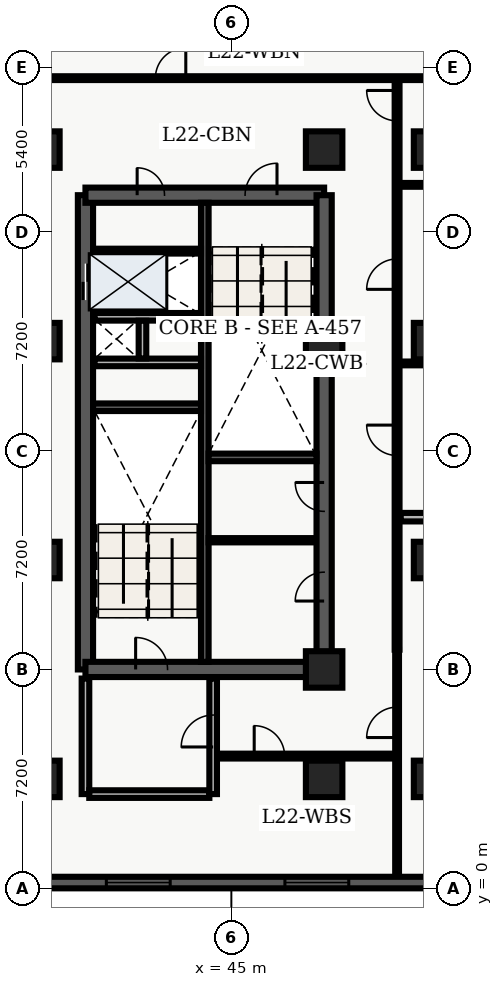
"""IFC4 building model, lengths in metres.
Left out: names, types, materials, properties, quantities, classifications, styles, units other than length and angle.
Written with IfcOpenShell. Run it as: python <this file> out.ifc"""

import sys

from ifc_helpers import new_model, entity, si_unit, converted_unit, direction, frame, origin_with_axes, origin_2d_with_axis, place, context, subcontext, project, spatial, polyline, rectangle, outline, extrude, element, fill, save


model = new_model("IFC4")
c1 = context("Model", 3, precision=1e-05, world=origin_with_axes(), true_north=direction((0.0, 1.0)))
c2 = subcontext(c1, "Body", "Model", "MODEL_VIEW")
j1 = project(units=[si_unit("LENGTHUNIT", "METRE"), converted_unit("PLANEANGLEUNIT", "DEGREE", entity("IfcPlaneAngleMeasure", 0.017), si_unit("PLANEANGLEUNIT", "RADIAN"), dimensions=[0, 0, 0, 0, 0, 0, 0])], contexts=[c1])
p1 = place(None, origin_with_axes())
s1 = spatial("IfcSite", under=j1, at=p1, CompositionType="ELEMENT")
p2 = place(p1, origin_with_axes())
s2 = spatial("IfcBuilding", under=s1, at=p2, CompositionType="ELEMENT")
p3 = place(p2, frame((0.0, 0.0, 93.0), z_axis=(0.0, 0.0, 1.0), x_axis=(1.0, 0.0, 0.0)))
s3 = spatial("IfcBuildingStorey", under=s2, at=p3, CompositionType="ELEMENT", Elevation=93.0)
p4 = place(p3, frame((40.2, 7.2, 0.0), z_axis=(0.0, 0.0, 1.0), x_axis=(0.0, 1.0, 0.0)))
e1 = element("IfcWall", 1, at=p4, inside=s3, PredefinedType="SHEAR", context=c2, shape_type="SweptSolid", body=[
    extrude(outline(polyline([(0.0, -0.25), (15.6, -0.25), (15.6, 0.25), (0.0, 0.25), (0.0, -0.25)])), origin_with_axes(), (0.0, 0.0, 1.0), 3.66),
])
p5 = place(p4, frame((12.75, 0.0, 0.0), z_axis=(0.0, 0.0, 1.0), x_axis=(1.0, 0.0, 0.0)))
e2 = element("IfcOpeningElement", 2, at=p5, cuts=e1, PredefinedType="OPENING", context=c2, shape_type="SweptSolid", body=[
    extrude(rectangle(XDim=1.2, YDim=0.52, at=origin_2d_with_axis()), origin_with_axes(), (0.0, 0.0, 1.0), 2.15),
])
p6 = place(p3, frame((40.2, 7.2, 0.0), z_axis=(0.0, 0.0, 1.0), x_axis=(1.0, 0.0, 0.0)))
e3 = element("IfcWall", 3, at=p6, inside=s3, PredefinedType="SHEAR", context=c2, shape_type="SweptSolid", body=[
    extrude(outline(polyline([(0.0, -0.25), (7.85, -0.25), (7.85, 0.25), (0.0, 0.25), (0.0, -0.25)])), origin_with_axes(), (0.0, 0.0, 1.0), 3.66),
])
p7 = place(p6, frame((2.175, 0.0, 0.0), z_axis=(0.0, 0.0, 1.0), x_axis=(1.0, 0.0, 0.0)))
e4 = element("IfcOpeningElement", 4, at=p7, cuts=e3, PredefinedType="OPENING", context=c2, shape_type="SweptSolid", body=[
    extrude(rectangle(XDim=1.05, YDim=0.52, at=origin_2d_with_axis()), origin_with_axes(), (0.0, 0.0, 1.0), 2.15),
])
p8 = place(p3, frame((40.2, 22.8, 0.0), z_axis=(0.0, 0.0, 1.0), x_axis=(1.0, 0.0, 0.0)))
e5 = element("IfcWall", 5, at=p8, inside=s3, PredefinedType="SHEAR", context=c2, shape_type="SweptSolid", body=[
    extrude(outline(polyline([(0.0, -0.25), (7.85, -0.25), (7.85, 0.25), (0.0, 0.25), (0.0, -0.25)])), origin_with_axes(), (0.0, 0.0, 1.0), 3.66),
])
p9 = place(p8, frame((5.775, 0.0, 0.0), z_axis=(0.0, 0.0, 1.0), x_axis=(1.0, 0.0, 0.0)))
e6 = element("IfcOpeningElement", 6, at=p9, cuts=e5, PredefinedType="OPENING", context=c2, shape_type="SweptSolid", body=[
    extrude(rectangle(XDim=1.05, YDim=0.52, at=origin_2d_with_axis()), origin_with_axes(), (0.0, 0.0, 1.0), 2.15),
])
p10 = place(p8, frame((2.15, 0.0, 0.0), z_axis=(0.0, 0.0, 1.0), x_axis=(1.0, 0.0, 0.0)))
e7 = element("IfcOpeningElement", 7, at=p10, cuts=e5, PredefinedType="OPENING", context=c2, shape_type="SweptSolid", body=[
    extrude(rectangle(XDim=0.9, YDim=0.52, at=origin_2d_with_axis()), origin_with_axes(), (0.0, 0.0, 1.0), 2.15),
])
p11 = place(p3, frame((48.05, 7.2, 0.0), z_axis=(0.0, 0.0, 1.0), x_axis=(0.0, 1.0, 0.0)))
e8 = element("IfcWall", 8, at=p11, inside=s3, PredefinedType="SHEAR", context=c2, shape_type="SweptSolid", body=[
    extrude(outline(polyline([(0.0, -0.25), (15.6, -0.25), (15.6, 0.25), (0.0, 0.25), (0.0, -0.25)])), origin_with_axes(), (0.0, 0.0, 1.0), 3.66),
])
p12 = place(p11, frame((2.725, 0.0, 0.0), z_axis=(0.0, 0.0, 1.0), x_axis=(1.0, 0.0, 0.0)))
e9 = element("IfcOpeningElement", 9, at=p12, cuts=e8, PredefinedType="OPENING", context=c2, shape_type="SweptSolid", body=[
    extrude(rectangle(XDim=0.95, YDim=0.52, at=origin_2d_with_axis()), origin_with_axes(), (0.0, 0.0, 1.0), 2.15),
])
p13 = place(p11, frame((5.675, 0.0, 0.0), z_axis=(0.0, 0.0, 1.0), x_axis=(1.0, 0.0, 0.0)))
e10 = element("IfcOpeningElement", 10, at=p13, cuts=e8, PredefinedType="OPENING", context=c2, shape_type="SweptSolid", body=[
    extrude(rectangle(XDim=0.95, YDim=0.52, at=origin_2d_with_axis()), origin_with_axes(), (0.0, 0.0, 1.0), 2.15),
])
p14 = place(p3, frame((44.125, 7.45, 0.0), z_axis=(0.0, 0.0, 1.0), x_axis=(0.0, 1.0, 0.0)))
e11 = element("IfcWall", 11, at=p14, inside=s3, PredefinedType="SHEAR", context=c2, shape_type="SweptSolid", body=[
    extrude(outline(polyline([(0.0, -0.125), (15.1, -0.125), (15.1, 0.125), (0.0, 0.125), (0.0, -0.125)])), origin_with_axes(), (0.0, 0.0, 1.0), 3.66),
])
for number, where, z_axis, x_axis in (
    (12, (40.45, 15.825, 0.0), (0.0, 0.0, 1.0), (1.0, 0.0, 0.0)),
    (13, (44.25, 14.175, 0.0), (0.0, 0.0, 1.0), (1.0, 0.0, 0.0)),
):
    element("IfcWall", number, at=place(p3, frame(where, z_axis=z_axis, x_axis=x_axis)), inside=s3, PredefinedType="SHEAR", context=c2, shape_type="SweptSolid", body=[
        extrude(outline(polyline([(0.0, -0.125), (3.55, -0.125), (3.55, 0.125), (0.0, 0.125), (0.0, -0.125)])), origin_with_axes(), (0.0, 0.0, 1.0), 3.66),
    ])
for number, where, z_axis, x_axis in (
    (14, (40.5, 17.3, 0.0), (0.0, 0.0, 1.0), (1.0, 0.0, 0.0)),
    (15, (40.5, 18.8, 0.0), (0.0, 0.0, 1.0), (1.0, 0.0, 0.0)),
):
    element("IfcWall", number, at=place(p3, frame(where, z_axis=z_axis, x_axis=x_axis)), inside=s3, PredefinedType="SOLIDWALL", context=c2, shape_type="SweptSolid", body=[
        extrude(outline(polyline([(0.0, -0.125), (3.5, -0.125), (3.5, 0.125), (0.0, 0.125), (0.0, -0.125)])), origin_with_axes(), (0.0, 0.0, 1.0), 2.7),
    ])
p15 = place(p3, frame((42.075, 17.43, 0.0), z_axis=(0.0, 0.0, 1.0), x_axis=(0.0, 1.0, 0.0)))
e16 = element("IfcWall", 16, at=p15, inside=s3, PredefinedType="SOLIDWALL", context=c2, shape_type="SweptSolid", body=[
    extrude(outline(polyline([(0.0, -0.125), (1.24, -0.125), (1.24, 0.125), (0.0, 0.125), (0.0, -0.125)])), origin_with_axes(), (0.0, 0.0, 1.0), 2.7),
])
p16 = place(p3, frame((40.2, 3.1, 0.0), z_axis=(0.0, 0.0, 1.0), x_axis=(0.0, 1.0, 0.0)))
e17 = element("IfcWall", 17, at=p16, inside=s3, PredefinedType="SOLIDWALL", context=c2, shape_type="SweptSolid", body=[
    extrude(outline(polyline([(0.0, -0.125), (3.8, -0.125), (3.8, 0.125), (0.0, 0.125), (0.0, -0.125)])), origin_with_axes(), (0.0, 0.0, 1.0), 2.7),
])
p17 = place(p3, frame((40.325, 3.1, 0.0), z_axis=(0.0, 0.0, 1.0), x_axis=(1.0, 0.0, 0.0)))
e18 = element("IfcWall", 18, at=p17, inside=s3, PredefinedType="SOLIDWALL", context=c2, shape_type="SweptSolid", body=[
    extrude(outline(polyline([(0.0, -0.125), (3.95, -0.125), (3.95, 0.125), (0.0, 0.125), (0.0, -0.125)])), origin_with_axes(), (0.0, 0.0, 1.0), 2.7),
])
p18 = place(p3, frame((44.4, 3.1, 0.0), z_axis=(0.0, 0.0, 1.0), x_axis=(0.0, 1.0, 0.0)))
e19 = element("IfcWall", 19, at=p18, inside=s3, PredefinedType="SOLIDWALL", context=c2, shape_type="SweptSolid", body=[
    extrude(outline(polyline([(0.0, -0.125), (3.8, -0.125), (3.8, 0.125), (0.0, 0.125), (0.0, -0.125)])), origin_with_axes(), (0.0, 0.0, 1.0), 2.7),
])
p19 = place(p18, frame((2.075, 0.0, 0.0), z_axis=(0.0, 0.0, 1.0), x_axis=(1.0, 0.0, 0.0)))
e20 = element("IfcOpeningElement", 20, at=p19, cuts=e19, PredefinedType="OPENING", context=c2, shape_type="SweptSolid", body=[
    extrude(rectangle(XDim=1.05, YDim=0.27, at=origin_2d_with_axis()), origin_with_axes(), (0.0, 0.0, 1.0), 2.15),
])
for number, where, z_axis, x_axis in (
    (21, (38.75, 3.6, 0.0), (0.0, 0.0, 1.0), (1.0, 0.0, 0.0)),
    (22, (38.75, 10.8, 0.0), (0.0, 0.0, 1.0), (1.0, 0.0, 0.0)),
    (23, (38.75, 18.0, 0.0), (0.0, 0.0, 1.0), (1.0, 0.0, 0.0)),
    (24, (38.75, 24.3, 0.0), (0.0, 0.0, 1.0), (1.0, 0.0, 0.0)),
    (25, (48.05, 3.6, 0.0), (0.0, 0.0, 1.0), (1.0, 0.0, 0.0)),
    (26, (48.05, 7.2, 0.0), (0.0, 0.0, 1.0), (1.0, 0.0, 0.0)),
    (27, (48.05, 18.0, 0.0), (0.0, 0.0, 1.0), (1.0, 0.0, 0.0)),
    (28, (48.05, 24.3, 0.0), (0.0, 0.0, 1.0), (1.0, 0.0, 0.0)),
    (29, (51.6, 3.6, 0.0), (0.0, 0.0, 1.0), (1.0, 0.0, 0.0)),
    (30, (51.6, 10.8, 0.0), (0.0, 0.0, 1.0), (1.0, 0.0, 0.0)),
    (31, (51.6, 18.0, 0.0), (0.0, 0.0, 1.0), (1.0, 0.0, 0.0)),
    (32, (51.6, 24.3, 0.0), (0.0, 0.0, 1.0), (1.0, 0.0, 0.0)),
):
    element("IfcColumn", number, at=place(p3, frame(where, z_axis=z_axis, x_axis=x_axis)), inside=s3, PredefinedType="COLUMN", context=c2, shape_type="SweptSolid", body=[
        extrude(rectangle(XDim=1.2, YDim=1.2, at=origin_2d_with_axis()), origin_with_axes(), (0.0, 0.0, 1.0), 3.9),
    ])
p20 = place(p3, frame((40.5, 20.96, 0.0), z_axis=(0.0, 0.0, 1.0), x_axis=(1.0, 0.0, 0.0)))
e33 = element("IfcWall", 33, at=p20, inside=s3, PredefinedType="PARTITIONING", context=c2, shape_type="SweptSolid", body=[
    extrude(outline(polyline([(0.0, -0.08), (3.5, -0.08), (3.5, 0.08), (0.0, 0.08), (0.0, -0.08)])), origin_with_axes(), (0.0, 0.0, 1.0), 2.7),
])
p21 = place(p3, frame((44.25, 11.45, 0.0), z_axis=(0.0, 0.0, 1.0), x_axis=(1.0, 0.0, 0.0)))
e34 = element("IfcWall", 34, at=p21, inside=s3, PredefinedType="PARTITIONING", context=c2, shape_type="SweptSolid", body=[
    extrude(outline(polyline([(0.0, -0.07), (3.5, -0.07), (3.5, 0.07), (0.0, 0.07), (0.0, -0.07)])), origin_with_axes(), (0.0, 0.0, 1.0), 2.7),
])
p22 = place(p3, frame((50.45, 7.85, 0.0), z_axis=(0.0, 0.0, 1.0), x_axis=(0.0, 1.0, 0.0)))
e35 = element("IfcWall", 35, at=p22, inside=s3, PredefinedType="PARTITIONING", context=c2, shape_type="SweptSolid", body=[
    extrude(outline(polyline([(0.0, -0.08), (18.8, -0.08), (18.8, 0.08), (0.0, 0.08), (0.0, -0.08)])), origin_with_axes(), (0.0, 0.0, 1.0), 2.7),
])
p23 = place(p22, frame((6.888, 0.0, 0.0), z_axis=(0.0, 0.0, 1.0), x_axis=(1.0, 0.0, 0.0)))
e36 = element("IfcOpeningElement", 36, at=p23, cuts=e35, PredefinedType="OPENING", context=c2, shape_type="SweptSolid", body=[
    extrude(rectangle(XDim=1.0, YDim=0.18, at=origin_2d_with_axis()), origin_with_axes(), (0.0, 0.0, 1.0), 2.15),
])
p24 = place(p22, frame((12.353, 0.0, 0.0), z_axis=(0.0, 0.0, 1.0), x_axis=(1.0, 0.0, 0.0)))
e37 = element("IfcOpeningElement", 37, at=p24, cuts=e35, PredefinedType="OPENING", context=c2, shape_type="SweptSolid", body=[
    extrude(rectangle(XDim=1.0, YDim=0.18, at=origin_2d_with_axis()), origin_with_axes(), (0.0, 0.0, 1.0), 2.15),
])
p25 = place(p22, frame((17.895, 0.0, 0.0), z_axis=(0.0, 0.0, 1.0), x_axis=(1.0, 0.0, 0.0)))
e38 = element("IfcOpeningElement", 38, at=p25, cuts=e35, PredefinedType="OPENING", context=c2, shape_type="SweptSolid", body=[
    extrude(rectangle(XDim=1.0, YDim=0.18, at=origin_2d_with_axis()), origin_with_axes(), (0.0, 0.0, 1.0), 2.15),
])
p26 = place(p3, frame((38.76, 26.65, 0.0), z_axis=(0.0, 0.0, 1.0), x_axis=(1.0, 0.0, 0.0)))
e39 = element("IfcWall", 39, at=p26, inside=s3, PredefinedType="PARTITIONING", context=c2, shape_type="SweptSolid", body=[
    extrude(outline(polyline([(0.0, -0.062), (20.88, -0.062), (20.88, 0.062), (0.0, 0.062), (0.0, -0.062)])), origin_with_axes(), (0.0, 0.0, 1.0), 2.7),
])
p27 = place(p26, frame((4.24, 0.0, 0.0), z_axis=(0.0, 0.0, 1.0), x_axis=(1.0, 0.0, 0.0)))
e40 = element("IfcOpeningElement", 40, at=p27, cuts=e39, PredefinedType="OPENING", context=c2, shape_type="SweptSolid", body=[
    extrude(rectangle(XDim=1.0, YDim=0.145, at=origin_2d_with_axis()), origin_with_axes(), (0.0, 0.0, 1.0), 2.15),
])
p28 = place(p3, frame((44.55, 4.35, 0.0), z_axis=(0.0, 0.0, 1.0), x_axis=(1.0, 0.0, 0.0)))
e41 = element("IfcWall", 41, at=p28, inside=s3, PredefinedType="PARTITIONING", context=c2, shape_type="SweptSolid", body=[
    extrude(outline(polyline([(0.0, -0.08), (5.9, -0.08), (5.9, 0.08), (0.0, 0.08), (0.0, -0.08)])), origin_with_axes(), (0.0, 0.0, 1.0), 2.7),
])
p29 = place(p28, frame((1.7, 0.0, 0.0), z_axis=(0.0, 0.0, 1.0), x_axis=(1.0, 0.0, 0.0)))
e42 = element("IfcOpeningElement", 42, at=p29, cuts=e41, PredefinedType="OPENING", context=c2, shape_type="SweptSolid", body=[
    extrude(rectangle(XDim=1.0, YDim=0.18, at=origin_2d_with_axis()), origin_with_axes(), (0.0, 0.0, 1.0), 2.15),
])
p30 = place(p3, frame((50.45, 0.36, 0.0), z_axis=(0.0, 0.0, 1.0), x_axis=(0.0, 1.0, 0.0)))
e43 = element("IfcWall", 43, at=p30, inside=s3, PredefinedType="PARTITIONING", context=c2, shape_type="SweptSolid", body=[
    extrude(outline(polyline([(0.0, -0.062), (7.49, -0.062), (7.49, 0.062), (0.0, 0.062), (0.0, -0.062)])), origin_with_axes(), (0.0, 0.0, 1.0), 2.7),
])
p31 = place(p30, frame((5.1, 0.0, 0.0), z_axis=(0.0, 0.0, 1.0), x_axis=(1.0, 0.0, 0.0)))
e44 = element("IfcOpeningElement", 44, at=p31, cuts=e43, PredefinedType="OPENING", context=c2, shape_type="SweptSolid", body=[
    extrude(rectangle(XDim=1.0, YDim=0.145, at=origin_2d_with_axis()), origin_with_axes(), (0.0, 0.0, 1.0), 2.15),
])
p32 = place(p3, frame((50.57, 12.209, 0.0), z_axis=(0.0, 0.0, 1.0), x_axis=(1.0, 0.0, 0.0)))
e45 = element("IfcWall", 45, at=p32, inside=s3, PredefinedType="PARTITIONING", context=c2, shape_type="SweptSolid", body=[
    extrude(outline(polyline([(0.0, -0.14), (9.055, -0.14), (9.055, 0.14), (0.0, 0.14), (0.0, -0.14)])), origin_with_axes(), (0.0, 0.0, 1.0), 2.7),
])
p33 = place(p32, frame((4.525, 0.0, 0.0), z_axis=(0.0, 0.0, 1.0), x_axis=(1.0, 0.0, 0.0)))
e46 = element("IfcOpeningElement", 46, at=p33, cuts=e45, PredefinedType="OPENING", context=c2, shape_type="SweptSolid", body=[
    extrude(rectangle(XDim=0.95, YDim=0.3, at=origin_2d_with_axis()), origin_with_axes(), (0.0, 0.0, 1.0), 2.15),
])
for number, where, z_axis, x_axis in (
    (47, (50.57, 17.266, 0.0), (0.0, 0.0, 1.0), (1.0, 0.0, 0.0)),
    (48, (50.57, 23.14, 0.0), (0.0, 0.0, 1.0), (1.0, 0.0, 0.0)),
):
    element("IfcWall", number, at=place(p3, frame(where, z_axis=z_axis, x_axis=x_axis)), inside=s3, PredefinedType="PARTITIONING", context=c2, shape_type="SweptSolid", body=[
        extrude(outline(polyline([(0.0, -0.062), (9.055, -0.062), (9.055, 0.062), (0.0, 0.062), (0.0, -0.062)])), origin_with_axes(), (0.0, 0.0, 1.0), 2.7),
    ])
p34 = place(p3, frame((57.22, 0.19, 0.0), z_axis=(0.0, 0.0, 1.0), x_axis=(-1.0, 0.0, 0.0)))
e49 = element("IfcWall", 49, at=p34, inside=s3, PredefinedType="SOLIDWALL", context=c2, shape_type="SweptSolid", body=[
    extrude(outline(polyline([(0.0, -0.19), (18.82, -0.19), (18.82, 0.19), (0.0, 0.19), (0.0, -0.19)])), origin_with_axes(), (0.0, 0.0, 1.0), 3.66),
])
p35 = place(p34, frame((3.537, 0.0, 0.45), z_axis=(0.0, 0.0, 1.0), x_axis=(1.0, 0.0, 0.0)))
e50 = element("IfcOpeningElement", 50, at=p35, cuts=e49, PredefinedType="OPENING", context=c2, shape_type="SweptSolid", body=[
    extrude(rectangle(XDim=2.1, YDim=0.4, at=origin_2d_with_axis()), origin_with_axes(), (0.0, 0.0, 1.0), 2.2),
])
p36 = place(p34, frame((9.41, 0.0, 0.45), z_axis=(0.0, 0.0, 1.0), x_axis=(1.0, 0.0, 0.0)))
e51 = element("IfcOpeningElement", 51, at=p36, cuts=e49, PredefinedType="OPENING", context=c2, shape_type="SweptSolid", body=[
    extrude(rectangle(XDim=2.1, YDim=0.4, at=origin_2d_with_axis()), origin_with_axes(), (0.0, 0.0, 1.0), 2.2),
])
p37 = place(p34, frame((15.283, 0.0, 0.45), z_axis=(0.0, 0.0, 1.0), x_axis=(1.0, 0.0, 0.0)))
e52 = element("IfcOpeningElement", 52, at=p37, cuts=e49, PredefinedType="OPENING", context=c2, shape_type="SweptSolid", body=[
    extrude(rectangle(XDim=2.1, YDim=0.4, at=origin_2d_with_axis()), origin_with_axes(), (0.0, 0.0, 1.0), 2.2),
])
p38 = place(p4, frame((12.75, 0.0, 0.0), z_axis=(0.0, 0.0, 1.0), x_axis=(1.0, 0.0, 0.0)))
e53 = element("IfcDoor", 53, at=p38, inside=s3, OperationType="DOUBLE_DOOR_SLIDING", PredefinedType="DOOR", context=c2, shape_type="SweptSolid", body=[
    extrude(rectangle(XDim=1.2, YDim=0.09, at=origin_2d_with_axis()), origin_with_axes(), (0.0, 0.0, 1.0), 2.15),
])
fill(e2, e53)
p39 = place(p6, frame((2.175, 0.0, 0.0), z_axis=(0.0, 0.0, 1.0), x_axis=(1.0, 0.0, 0.0)))
e54 = element("IfcDoor", 54, at=p39, inside=s3, OperationType="SINGLE_SWING_LEFT", PredefinedType="DOOR", context=c2, shape_type="SweptSolid", body=[
    extrude(rectangle(XDim=1.05, YDim=0.09, at=origin_2d_with_axis()), origin_with_axes(), (0.0, 0.0, 1.0), 2.15),
])
fill(e4, e54)
p40 = place(p8, frame((5.775, 0.0, 0.0), z_axis=(0.0, 0.0, 1.0), x_axis=(1.0, 0.0, 0.0)))
e55 = element("IfcDoor", 55, at=p40, inside=s3, OperationType="SINGLE_SWING_RIGHT", PredefinedType="DOOR", context=c2, shape_type="SweptSolid", body=[
    extrude(rectangle(XDim=1.05, YDim=0.09, at=origin_2d_with_axis()), origin_with_axes(), (0.0, 0.0, 1.0), 2.15),
])
fill(e6, e55)
p41 = place(p18, frame((2.075, 0.0, 0.0), z_axis=(0.0, 0.0, 1.0), x_axis=(1.0, 0.0, 0.0)))
e56 = element("IfcDoor", 56, at=p41, inside=s3, OperationType="SINGLE_SWING_LEFT", PredefinedType="DOOR", context=c2, shape_type="SweptSolid", body=[
    extrude(rectangle(XDim=1.05, YDim=0.09, at=origin_2d_with_axis()), origin_with_axes(), (0.0, 0.0, 1.0), 2.15),
])
fill(e20, e56)
p42 = place(p8, frame((2.15, 0.0, 0.0), z_axis=(0.0, 0.0, 1.0), x_axis=(1.0, 0.0, 0.0)))
e57 = element("IfcDoor", 57, at=p42, inside=s3, OperationType="SINGLE_SWING_LEFT", PredefinedType="DOOR", context=c2, shape_type="SweptSolid", body=[
    extrude(rectangle(XDim=0.9, YDim=0.09, at=origin_2d_with_axis()), origin_with_axes(), (0.0, 0.0, 1.0), 2.15),
])
fill(e7, e57)
p43 = place(p11, frame((2.725, 0.0, 0.0), z_axis=(0.0, 0.0, 1.0), x_axis=(1.0, 0.0, 0.0)))
e58 = element("IfcDoor", 58, at=p43, inside=s3, OperationType="SINGLE_SWING_LEFT", PredefinedType="DOOR", context=c2, shape_type="SweptSolid", body=[
    extrude(rectangle(XDim=0.95, YDim=0.09, at=origin_2d_with_axis()), origin_with_axes(), (0.0, 0.0, 1.0), 2.15),
])
fill(e9, e58)
p44 = place(p11, frame((5.675, 0.0, 0.0), z_axis=(0.0, 0.0, 1.0), x_axis=(1.0, 0.0, 0.0)))
e59 = element("IfcDoor", 59, at=p44, inside=s3, OperationType="SINGLE_SWING_RIGHT", PredefinedType="DOOR", context=c2, shape_type="SweptSolid", body=[
    extrude(rectangle(XDim=0.95, YDim=0.09, at=origin_2d_with_axis()), origin_with_axes(), (0.0, 0.0, 1.0), 2.15),
])
fill(e10, e59)
p45 = place(p28, frame((1.7, 0.0, 0.0), z_axis=(0.0, 0.0, 1.0), x_axis=(1.0, 0.0, 0.0)))
e60 = element("IfcDoor", 60, at=p45, inside=s3, OperationType="SINGLE_SWING_LEFT", PredefinedType="DOOR", context=c2, shape_type="SweptSolid", body=[
    extrude(rectangle(XDim=1.0, YDim=0.09, at=origin_2d_with_axis()), origin_with_axes(), (0.0, 0.0, 1.0), 2.15),
])
fill(e42, e60)
p46 = place(p30, frame((5.1, 0.0, 0.0), z_axis=(0.0, 0.0, 1.0), x_axis=(1.0, 0.0, 0.0)))
e61 = element("IfcDoor", 61, at=p46, inside=s3, OperationType="SINGLE_SWING_LEFT", PredefinedType="DOOR", context=c2, shape_type="SweptSolid", body=[
    extrude(rectangle(XDim=1.0, YDim=0.075, at=origin_2d_with_axis()), origin_with_axes(), (0.0, 0.0, 1.0), 2.15),
])
fill(e44, e61)
p47 = place(p26, frame((4.24, 0.0, 0.0), z_axis=(0.0, 0.0, 1.0), x_axis=(1.0, 0.0, 0.0)))
e62 = element("IfcDoor", 62, at=p47, inside=s3, OperationType="SINGLE_SWING_RIGHT", PredefinedType="DOOR", context=c2, shape_type="SweptSolid", body=[
    extrude(rectangle(XDim=1.0, YDim=0.075, at=origin_2d_with_axis()), origin_with_axes(), (0.0, 0.0, 1.0), 2.15),
])
fill(e40, e62)
p48 = place(p22, frame((6.888, 0.0, 0.0), z_axis=(0.0, 0.0, 1.0), x_axis=(1.0, 0.0, 0.0)))
e63 = element("IfcDoor", 63, at=p48, inside=s3, OperationType="SINGLE_SWING_RIGHT", PredefinedType="DOOR", context=c2, shape_type="SweptSolid", body=[
    extrude(rectangle(XDim=1.0, YDim=0.09, at=origin_2d_with_axis()), origin_with_axes(), (0.0, 0.0, 1.0), 2.15),
])
fill(e36, e63)
p49 = place(p22, frame((12.353, 0.0, 0.0), z_axis=(0.0, 0.0, 1.0), x_axis=(1.0, 0.0, 0.0)))
e64 = element("IfcDoor", 64, at=p49, inside=s3, OperationType="SINGLE_SWING_LEFT", PredefinedType="DOOR", context=c2, shape_type="SweptSolid", body=[
    extrude(rectangle(XDim=1.0, YDim=0.09, at=origin_2d_with_axis()), origin_with_axes(), (0.0, 0.0, 1.0), 2.15),
])
fill(e37, e64)
p50 = place(p22, frame((17.895, 0.0, 0.0), z_axis=(0.0, 0.0, 1.0), x_axis=(1.0, 0.0, 0.0)))
e65 = element("IfcDoor", 65, at=p50, inside=s3, OperationType="SINGLE_SWING_RIGHT", PredefinedType="DOOR", context=c2, shape_type="SweptSolid", body=[
    extrude(rectangle(XDim=1.0, YDim=0.09, at=origin_2d_with_axis()), origin_with_axes(), (0.0, 0.0, 1.0), 2.15),
])
fill(e38, e65)
p51 = place(p34, frame((9.41, 0.0, 0.45), z_axis=(0.0, 0.0, 1.0), x_axis=(1.0, 0.0, 0.0)))
e66 = element("IfcWindow", 66, at=p51, inside=s3, PredefinedType="WINDOW", context=c2, shape_type="SweptSolid", body=[
    extrude(rectangle(XDim=2.1, YDim=0.09, at=origin_2d_with_axis()), origin_with_axes(), (0.0, 0.0, 1.0), 2.2),
])
fill(e51, e66)
p52 = place(p34, frame((15.283, 0.0, 0.45), z_axis=(0.0, 0.0, 1.0), x_axis=(1.0, 0.0, 0.0)))
e67 = element("IfcWindow", 67, at=p52, inside=s3, PredefinedType="WINDOW", context=c2, shape_type="SweptSolid", body=[
    extrude(rectangle(XDim=2.1, YDim=0.09, at=origin_2d_with_axis()), origin_with_axes(), (0.0, 0.0, 1.0), 2.2),
])
fill(e52, e67)
save(model, sys.argv[1])
